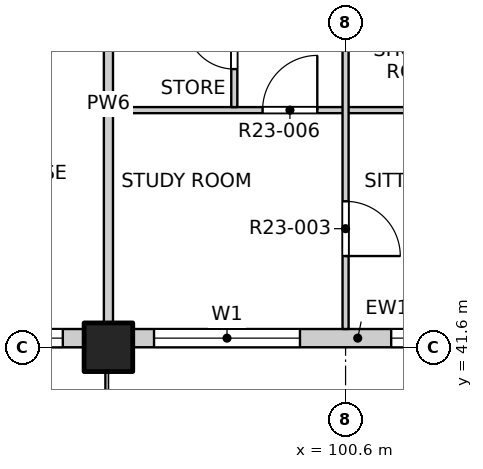
"""IFC4 building model, lengths in metres.
Left out: names, types, materials, properties, quantities, classifications, styles, units other than length and angle.
Written with IfcOpenShell. Run it as: python <this file> out.ifc"""

import sys

from ifc_helpers import new_model, si_unit, direction, frame, frame_2d, origin, origin_2d, place, context, subcontext, project, spatial, rectangle, extrude, element, fill, save


model = new_model("IFC4")
c1 = context("Model", 3, precision=1e-05, world=origin(), true_north=direction((0.0, 1.0)))
c2 = subcontext(c1, "Body", "Model", "MODEL_VIEW")
j1 = project(units=[si_unit("LENGTHUNIT", "METRE"), si_unit("PLANEANGLEUNIT", "RADIAN")], contexts=[c1])
p1 = place(None, origin())
s1 = spatial("IfcSite", under=j1, at=p1, CompositionType="ELEMENT")
p2 = place(p1, origin())
s2 = spatial("IfcBuilding", under=s1, at=p2, CompositionType="ELEMENT")
p3 = place(p2, frame((0.0, 0.0, 238.1)))
s3 = spatial("IfcBuildingStorey", under=s2, at=p3, CompositionType="ELEMENT", Elevation=238.1)
p4 = place(p3, frame((96.7, 41.6, -0.25), z_axis=(0.0, 0.0, 1.0), x_axis=(1.0, 0.0, 0.0)))
e1 = element("IfcColumn", 1, at=p4, inside=s3, PredefinedType="COLUMN", context=c2, shape_type="SweptSolid", body=[
    extrude(rectangle(XDim=0.8, YDim=0.8, at=origin_2d()), origin(), (0.0, 0.0, 1.0), 3.35),
])
p5 = place(p3, frame((89.3, 41.75, 0.0), z_axis=(0.0, 0.0, 1.0), x_axis=(1.0, 0.0, 0.0)))
e2 = element("IfcWall", 2, at=p5, inside=s3, PredefinedType="SOLIDWALL", context=c2, shape_type="SweptSolid", body=[
    extrude(rectangle(XDim=7.0, YDim=0.3, at=frame_2d((3.5, 0.0))), origin(), (0.0, 0.0, 1.0), 3.1),
])
p6 = place(p5, frame((0.65, 0.0, 0.0)))
e3 = element("IfcOpeningElement", 3, at=p6, cuts=e2, PredefinedType="OPENING", context=c2, shape_type="SweptSolid", body=[
    extrude(rectangle(XDim=1.8, YDim=2.4, at=frame_2d((0.9, 1.2))), frame((0.0, 0.16, 0.0), z_axis=(0.0, -1.0, 0.0), x_axis=(1.0, 0.0, 0.0)), (0.0, 0.0, 1.0), 0.32),
])
p7 = place(p5, frame((4.25, 0.0, 0.9)))
e4 = element("IfcOpeningElement", 4, at=p7, cuts=e2, PredefinedType="OPENING", context=c2, shape_type="SweptSolid", body=[
    extrude(rectangle(XDim=2.4, YDim=1.8, at=frame_2d((1.2, 0.9))), frame((0.0, 0.16, 0.0), z_axis=(0.0, -1.0, 0.0), x_axis=(1.0, 0.0, 0.0)), (0.0, 0.0, 1.0), 0.32),
])
p8 = place(p3, frame((97.1, 41.75, 0.0), z_axis=(0.0, 0.0, 1.0), x_axis=(1.0, 0.0, 0.0)))
e5 = element("IfcWall", 5, at=p8, inside=s3, PredefinedType="SOLIDWALL", context=c2, shape_type="SweptSolid", body=[
    extrude(rectangle(XDim=7.4, YDim=0.3, at=frame_2d((3.7, 0.0))), origin(), (0.0, 0.0, 1.0), 3.1),
])
p9 = place(p8, frame((0.35, 0.0, 0.9)))
e6 = element("IfcOpeningElement", 6, at=p9, cuts=e5, PredefinedType="OPENING", context=c2, shape_type="SweptSolid", body=[
    extrude(rectangle(XDim=2.4, YDim=1.8, at=frame_2d((1.2, 0.9))), frame((0.0, 0.16, 0.0), z_axis=(0.0, -1.0, 0.0), x_axis=(1.0, 0.0, 0.0)), (0.0, 0.0, 1.0), 0.32),
])
p10 = place(p8, frame((4.25, 0.0, 0.9)))
e7 = element("IfcOpeningElement", 7, at=p10, cuts=e5, PredefinedType="OPENING", context=c2, shape_type="SweptSolid", body=[
    extrude(rectangle(XDim=2.4, YDim=1.8, at=frame_2d((1.2, 0.9))), frame((0.0, 0.16, 0.0), z_axis=(0.0, -1.0, 0.0), x_axis=(1.0, 0.0, 0.0)), (0.0, 0.0, 1.0), 0.32),
])
p11 = place(p3, frame((96.625, 45.5, 0.0), z_axis=(0.0, 0.0, 1.0), x_axis=(1.0, 0.0, 0.0)))
e8 = element("IfcWall", 8, at=p11, inside=s3, PredefinedType="PARTITIONING", context=c2, shape_type="SweptSolid", body=[
    extrude(rectangle(XDim=11.475, YDim=0.1, at=frame_2d((5.738, 0.0))), origin(), (0.0, 0.0, 1.0), 3.1),
])
p12 = place(p11, frame((2.61, 0.0, 0.0)))
e9 = element("IfcOpeningElement", 9, at=p12, cuts=e8, PredefinedType="OPENING", context=c2, shape_type="SweptSolid", body=[
    extrude(rectangle(XDim=0.9, YDim=2.1, at=frame_2d((0.45, 1.05))), frame((0.0, 0.06, 0.0), z_axis=(0.0, -1.0, 0.0), x_axis=(1.0, 0.0, 0.0)), (0.0, 0.0, 1.0), 0.12),
])
p13 = place(p3, frame((96.7, 41.9, 0.0), z_axis=(0.0, 0.0, 1.0), x_axis=(0.0, 1.0, 0.0)))
e10 = element("IfcWall", 10, at=p13, inside=s3, PredefinedType="PARTITIONING", context=c2, shape_type="SweptSolid", body=[
    extrude(rectangle(XDim=7.4, YDim=0.15, at=frame_2d((3.7, 0.0))), origin(), (0.0, 0.0, 1.0), 3.1),
])
p14 = place(p3, frame((98.77, 45.55, 0.0), z_axis=(0.0, 0.0, 1.0), x_axis=(0.0, 1.0, 0.0)))
e11 = element("IfcWall", 11, at=p14, inside=s3, PredefinedType="PARTITIONING", context=c2, shape_type="SweptSolid", body=[
    extrude(rectangle(XDim=8.25, YDim=0.1, at=frame_2d((4.125, 0.0))), origin(), (0.0, 0.0, 1.0), 3.1),
])
p15 = place(p14, frame((0.625, 0.0, 0.0)))
e12 = element("IfcOpeningElement", 12, at=p15, cuts=e11, PredefinedType="OPENING", context=c2, shape_type="SweptSolid", body=[
    extrude(rectangle(XDim=0.8, YDim=2.1, at=frame_2d((0.4, 1.05))), frame((0.0, 0.06, 0.0), z_axis=(0.0, -1.0, 0.0), x_axis=(1.0, 0.0, 0.0)), (0.0, 0.0, 1.0), 0.12),
])
p16 = place(p14, frame((2.55, 0.0, 0.0)))
e13 = element("IfcOpeningElement", 13, at=p16, cuts=e11, PredefinedType="OPENING", context=c2, shape_type="SweptSolid", body=[
    extrude(rectangle(XDim=0.9, YDim=2.1, at=frame_2d((0.45, 1.05))), frame((0.0, 0.06, 0.0), z_axis=(0.0, -1.0, 0.0), x_axis=(1.0, 0.0, 0.0)), (0.0, 0.0, 1.0), 0.12),
])
p17 = place(p14, frame((4.575, 0.0, 0.0)))
e14 = element("IfcOpeningElement", 14, at=p17, cuts=e11, PredefinedType="OPENING", context=c2, shape_type="SweptSolid", body=[
    extrude(rectangle(XDim=0.9, YDim=2.1, at=frame_2d((0.45, 1.05))), frame((0.0, 0.06, 0.0), z_axis=(0.0, -1.0, 0.0), x_axis=(1.0, 0.0, 0.0)), (0.0, 0.0, 1.0), 0.12),
])
p18 = place(p14, frame((6.825, 0.0, 0.0)))
e15 = element("IfcOpeningElement", 15, at=p18, cuts=e11, PredefinedType="OPENING", context=c2, shape_type="SweptSolid", body=[
    extrude(rectangle(XDim=0.8, YDim=2.1, at=frame_2d((0.4, 1.05))), frame((0.0, 0.06, 0.0), z_axis=(0.0, -1.0, 0.0), x_axis=(1.0, 0.0, 0.0)), (0.0, 0.0, 1.0), 0.12),
])
p19 = place(p3, frame((100.6, 41.9, 0.0), z_axis=(0.0, 0.0, 1.0), x_axis=(0.0, 1.0, 0.0)))
e16 = element("IfcWall", 16, at=p19, inside=s3, PredefinedType="PARTITIONING", context=c2, shape_type="SweptSolid", body=[
    extrude(rectangle(XDim=46.2, YDim=0.1, at=frame_2d((23.1, 0.0))), origin(), (0.0, 0.0, 1.0), 3.1),
])
p20 = place(p19, frame((1.2, 0.0, 0.0)))
e17 = element("IfcOpeningElement", 17, at=p20, cuts=e16, PredefinedType="OPENING", context=c2, shape_type="SweptSolid", body=[
    extrude(rectangle(XDim=0.9, YDim=2.1, at=frame_2d((0.45, 1.05))), frame((0.0, 0.06, 0.0), z_axis=(0.0, -1.0, 0.0), x_axis=(1.0, 0.0, 0.0)), (0.0, 0.0, 1.0), 0.12),
])
p21 = place(p19, frame((6.025, 0.0, 0.0)))
e18 = element("IfcOpeningElement", 18, at=p21, cuts=e16, PredefinedType="OPENING", context=c2, shape_type="SweptSolid", body=[
    extrude(rectangle(XDim=0.9, YDim=2.1, at=frame_2d((0.45, 1.05))), frame((0.0, 0.06, 0.0), z_axis=(0.0, -1.0, 0.0), x_axis=(1.0, 0.0, 0.0)), (0.0, 0.0, 1.0), 0.12),
])
p22 = place(p19, frame((9.975, 0.0, 0.0)))
e19 = element("IfcOpeningElement", 19, at=p22, cuts=e16, PredefinedType="OPENING", context=c2, shape_type="SweptSolid", body=[
    extrude(rectangle(XDim=0.9, YDim=2.1, at=frame_2d((0.45, 1.05))), frame((0.0, 0.06, 0.0), z_axis=(0.0, -1.0, 0.0), x_axis=(1.0, 0.0, 0.0)), (0.0, 0.0, 1.0), 0.12),
])
p23 = place(p19, frame((12.9, 0.0, 0.0)))
e20 = element("IfcOpeningElement", 20, at=p23, cuts=e16, PredefinedType="OPENING", context=c2, shape_type="SweptSolid", body=[
    extrude(rectangle(XDim=0.9, YDim=2.1, at=frame_2d((0.45, 1.05))), frame((0.0, 0.06, 0.0), z_axis=(0.0, -1.0, 0.0), x_axis=(1.0, 0.0, 0.0)), (0.0, 0.0, 1.0), 0.12),
])
p24 = place(p19, frame((17.775, 0.0, 0.0)))
e21 = element("IfcOpeningElement", 21, at=p24, cuts=e16, PredefinedType="OPENING", context=c2, shape_type="SweptSolid", body=[
    extrude(rectangle(XDim=0.9, YDim=2.1, at=frame_2d((0.45, 1.05))), frame((0.0, 0.06, 0.0), z_axis=(0.0, -1.0, 0.0), x_axis=(1.0, 0.0, 0.0)), (0.0, 0.0, 1.0), 0.12),
])
p25 = place(p19, frame((21.625, 0.0, 0.0)))
e22 = element("IfcOpeningElement", 22, at=p25, cuts=e16, PredefinedType="OPENING", context=c2, shape_type="SweptSolid", body=[
    extrude(rectangle(XDim=0.9, YDim=2.1, at=frame_2d((0.45, 1.05))), frame((0.0, 0.06, 0.0), z_axis=(0.0, -1.0, 0.0), x_axis=(1.0, 0.0, 0.0)), (0.0, 0.0, 1.0), 0.12),
])
p26 = place(p19, frame((25.575, 0.0, 0.0)))
e23 = element("IfcOpeningElement", 23, at=p26, cuts=e16, PredefinedType="OPENING", context=c2, shape_type="SweptSolid", body=[
    extrude(rectangle(XDim=0.9, YDim=2.1, at=frame_2d((0.45, 1.05))), frame((0.0, 0.06, 0.0), z_axis=(0.0, -1.0, 0.0), x_axis=(1.0, 0.0, 0.0)), (0.0, 0.0, 1.0), 0.12),
])
p27 = place(p19, frame((28.5, 0.0, 0.0)))
e24 = element("IfcOpeningElement", 24, at=p27, cuts=e16, PredefinedType="OPENING", context=c2, shape_type="SweptSolid", body=[
    extrude(rectangle(XDim=0.9, YDim=2.1, at=frame_2d((0.45, 1.05))), frame((0.0, 0.06, 0.0), z_axis=(0.0, -1.0, 0.0), x_axis=(1.0, 0.0, 0.0)), (0.0, 0.0, 1.0), 0.12),
])
p28 = place(p19, frame((33.375, 0.0, 0.0)))
e25 = element("IfcOpeningElement", 25, at=p28, cuts=e16, PredefinedType="OPENING", context=c2, shape_type="SweptSolid", body=[
    extrude(rectangle(XDim=0.9, YDim=2.1, at=frame_2d((0.45, 1.05))), frame((0.0, 0.06, 0.0), z_axis=(0.0, -1.0, 0.0), x_axis=(1.0, 0.0, 0.0)), (0.0, 0.0, 1.0), 0.12),
])
p29 = place(p19, frame((36.3, 0.0, 0.0)))
e26 = element("IfcOpeningElement", 26, at=p29, cuts=e16, PredefinedType="OPENING", context=c2, shape_type="SweptSolid", body=[
    extrude(rectangle(XDim=0.9, YDim=2.1, at=frame_2d((0.45, 1.05))), frame((0.0, 0.06, 0.0), z_axis=(0.0, -1.0, 0.0), x_axis=(1.0, 0.0, 0.0)), (0.0, 0.0, 1.0), 0.12),
])
p30 = place(p19, frame((40.2, 0.0, 0.0)))
e27 = element("IfcOpeningElement", 27, at=p30, cuts=e16, PredefinedType="OPENING", context=c2, shape_type="SweptSolid", body=[
    extrude(rectangle(XDim=0.9, YDim=2.1, at=frame_2d((0.45, 1.05))), frame((0.0, 0.06, 0.0), z_axis=(0.0, -1.0, 0.0), x_axis=(1.0, 0.0, 0.0)), (0.0, 0.0, 1.0), 0.12),
])
p31 = place(p19, frame((44.1, 0.0, 0.0)))
e28 = element("IfcOpeningElement", 28, at=p31, cuts=e16, PredefinedType="OPENING", context=c2, shape_type="SweptSolid", body=[
    extrude(rectangle(XDim=0.9, YDim=2.1, at=frame_2d((0.45, 1.05))), frame((0.0, 0.06, 0.0), z_axis=(0.0, -1.0, 0.0), x_axis=(1.0, 0.0, 0.0)), (0.0, 0.0, 1.0), 0.12),
])
p32 = place(p7, origin())
e29 = element("IfcWindow", 29, at=p32, inside=s3, PartitioningType="DOUBLE_PANEL_VERTICAL", PredefinedType="WINDOW", context=c2, shape_type="SweptSolid", body=[
    extrude(rectangle(XDim=2.4, YDim=1.8, at=frame_2d((1.2, 0.9))), frame((0.0, 0.03, 0.0), z_axis=(0.0, -1.0, 0.0), x_axis=(1.0, 0.0, 0.0)), (0.0, 0.0, 1.0), 0.06),
])
fill(e4, e29)
p33 = place(p9, origin())
e30 = element("IfcWindow", 30, at=p33, inside=s3, PartitioningType="DOUBLE_PANEL_VERTICAL", PredefinedType="WINDOW", context=c2, shape_type="SweptSolid", body=[
    extrude(rectangle(XDim=2.4, YDim=1.8, at=frame_2d((1.2, 0.9))), frame((0.0, 0.03, 0.0), z_axis=(0.0, -1.0, 0.0), x_axis=(1.0, 0.0, 0.0)), (0.0, 0.0, 1.0), 0.06),
])
fill(e6, e30)
p34 = place(p10, origin())
e31 = element("IfcWindow", 31, at=p34, inside=s3, PartitioningType="DOUBLE_PANEL_VERTICAL", PredefinedType="WINDOW", context=c2, shape_type="SweptSolid", body=[
    extrude(rectangle(XDim=2.4, YDim=1.8, at=frame_2d((1.2, 0.9))), frame((0.0, 0.03, 0.0), z_axis=(0.0, -1.0, 0.0), x_axis=(1.0, 0.0, 0.0)), (0.0, 0.0, 1.0), 0.06),
])
fill(e7, e31)
p35 = place(p20, origin())
e32 = element("IfcDoor", 32, at=p35, inside=s3, OperationType="SINGLE_SWING_RIGHT", PredefinedType="DOOR", context=c2, shape_type="SweptSolid", body=[
    extrude(rectangle(XDim=0.9, YDim=2.1, at=frame_2d((0.45, 1.05))), frame((0.0, 0.025, 0.0), z_axis=(0.0, -1.0, 0.0), x_axis=(1.0, 0.0, 0.0)), (0.0, 0.0, 1.0), 0.05),
])
fill(e17, e32)
p36 = place(p12, origin())
e33 = element("IfcDoor", 33, at=p36, inside=s3, OperationType="SINGLE_SWING_RIGHT", PredefinedType="DOOR", context=c2, shape_type="SweptSolid", body=[
    extrude(rectangle(XDim=0.9, YDim=2.1, at=frame_2d((0.45, 1.05))), frame((0.0, 0.025, 0.0), z_axis=(0.0, -1.0, 0.0), x_axis=(1.0, 0.0, 0.0)), (0.0, 0.0, 1.0), 0.05),
])
fill(e9, e33)
p37 = place(p15, origin())
e34 = element("IfcDoor", 34, at=p37, inside=s3, OperationType="SINGLE_SWING_RIGHT", PredefinedType="DOOR", context=c2, shape_type="SweptSolid", body=[
    extrude(rectangle(XDim=0.8, YDim=2.1, at=frame_2d((0.4, 1.05))), frame((0.0, 0.025, 0.0), z_axis=(0.0, -1.0, 0.0), x_axis=(1.0, 0.0, 0.0)), (0.0, 0.0, 1.0), 0.05),
])
fill(e12, e34)
save(model, sys.argv[1])
